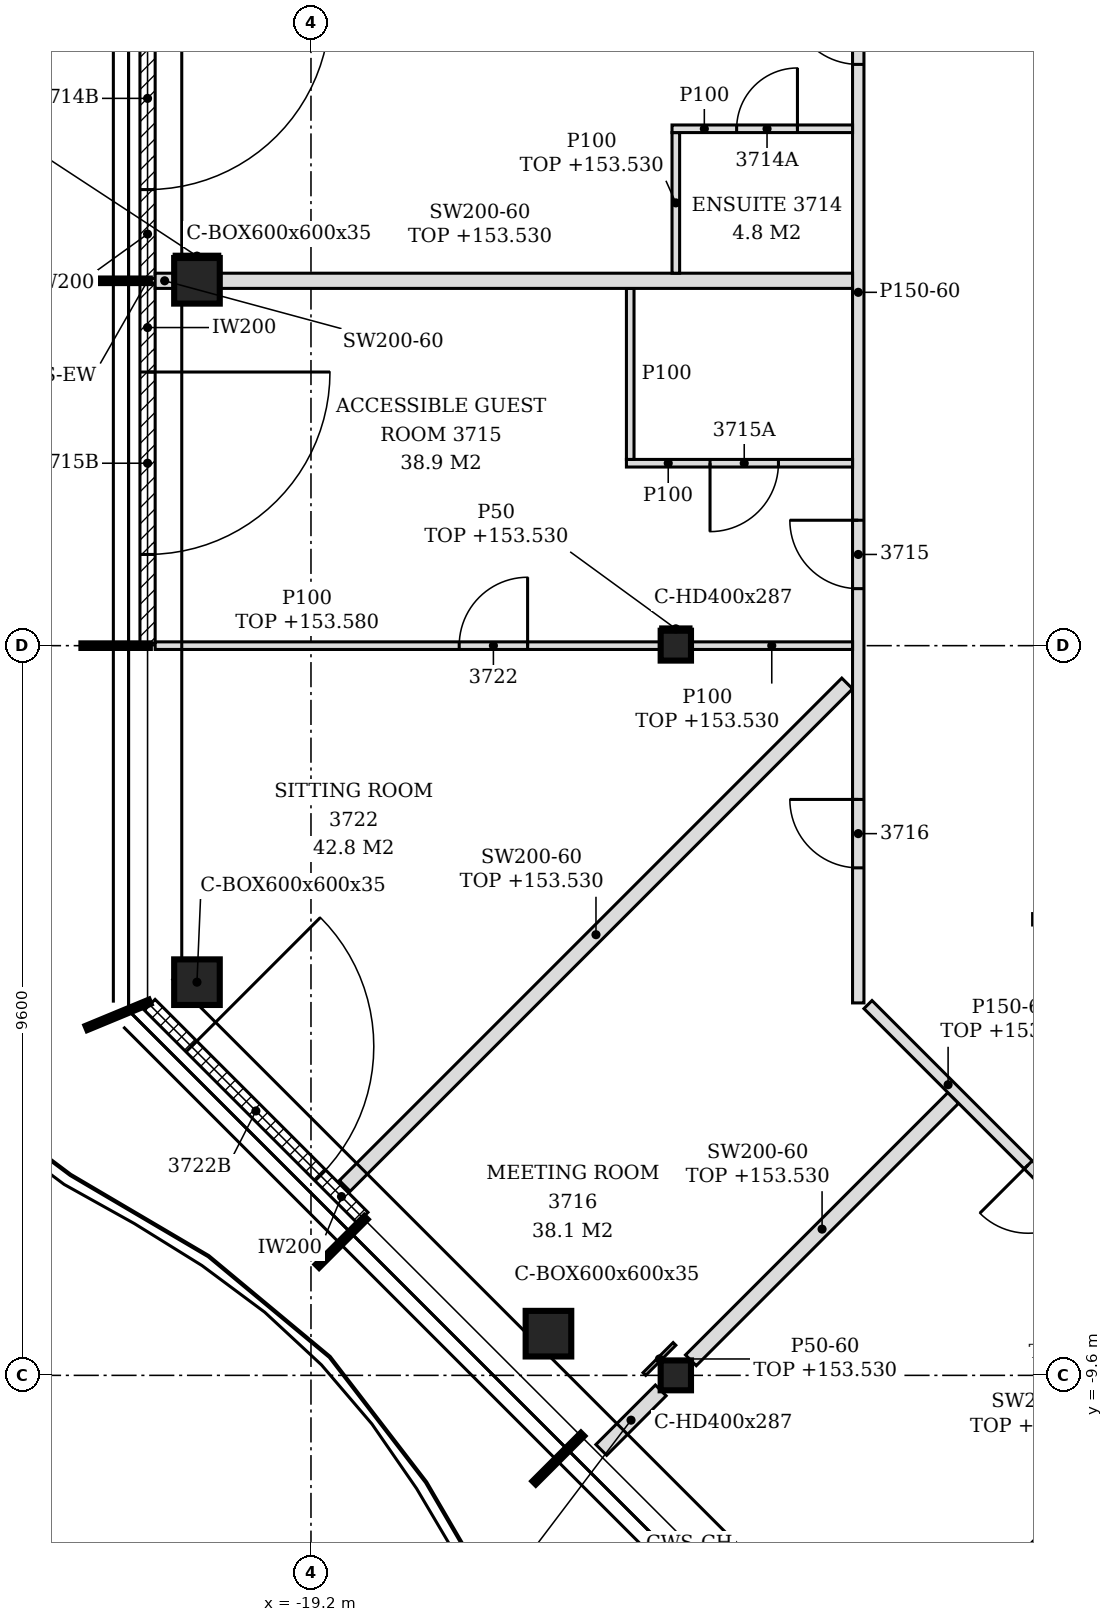
"""IFC4 building model, lengths in metres.
Left out: names, types, materials, properties, quantities, classifications, styles, units other than length and angle.
Written with IfcOpenShell. Run it as: python <this file> out.ifc"""

import sys

from ifc_helpers import new_model, si_unit, direction, frame, frame_2d, origin, origin_2d, place, context, subcontext, project, spatial, polyline, rectangle, hollow_rectangle, i_section, outline, extrude, element, fill, save


model = new_model("IFC4")
c1 = context("Model", 3, precision=1e-05, world=origin(), true_north=direction((0.0, 1.0)))
c2 = subcontext(c1, "Body", "Model", "MODEL_VIEW")
j1 = project(units=[si_unit("LENGTHUNIT", "METRE"), si_unit("PLANEANGLEUNIT", "RADIAN")], contexts=[c1])
p1 = place(None, origin())
s1 = spatial("IfcSite", under=j1, at=p1, CompositionType="ELEMENT")
p2 = place(p1, origin())
s2 = spatial("IfcBuilding", under=s1, at=p2, CompositionType="ELEMENT")
p3 = place(p2, frame((0.0, 0.0, 150.6)))
s3 = spatial("IfcBuildingStorey", under=s2, at=p3, CompositionType="ELEMENT", Elevation=150.6)
for number, where, z_axis, x_axis in (
    (1, (-20.7, 4.8, -0.15), (0.0, 0.0, 1.0), (1.0, 0.0, 0.0)),
    (2, (-20.7, -4.427, -0.15), (0.0, 0.0, 1.0), (1.0, 0.0, 0.0)),
    (3, (-16.076, -9.052, -0.15), (0.0, 0.0, 1.0), (1.0, 0.0, 0.0)),
):
    element("IfcColumn", number, at=place(p3, frame(where, z_axis=z_axis, x_axis=x_axis)), inside=s3, PredefinedType="COLUMN", context=c2, shape_type="SweptSolid", body=[
        extrude(hollow_rectangle(XDim=0.6, YDim=0.6, WallThickness=0.035, at=origin_2d()), origin(), (0.0, 0.0, 1.0), 3.6),
    ])
for number, where, z_axis, x_axis in (
    (4, (-14.4, -9.6, -0.15), (0.0, 0.0, 1.0), (1.0, 0.0, 0.0)),
    (5, (-14.4, 0.0, -0.15), (0.0, 0.0, 1.0), (1.0, 0.0, 0.0)),
):
    element("IfcColumn", number, at=place(p3, frame(where, z_axis=z_axis, x_axis=x_axis)), inside=s3, PredefinedType="COLUMN", context=c2, shape_type="SweptSolid", body=[
        extrude(i_section(OverallWidth=0.399, OverallDepth=0.393, WebThickness=0.023, FlangeThickness=0.037, FilletRadius=0.015, at=origin_2d()), origin(), (0.0, 0.0, 1.0), 3.6),
    ])
p4 = place(p3, frame((-21.35, 9.57, 0.0), z_axis=(0.0, 0.0, 1.0), x_axis=(0.0, -1.0, 0.0)))
e6 = element("IfcWall", 6, at=p4, inside=s3, PredefinedType="NOTDEFINED", context=c2, shape_type="SweptSolid", body=[
    extrude(rectangle(XDim=4.74, YDim=0.2, at=frame_2d((2.37, 0.0))), origin(), (0.0, 0.0, 1.0), 3.45),
])
p5 = place(p4, frame((1.17, 0.0, 0.0)))
e7 = element("IfcOpeningElement", 7, at=p5, cuts=e6, PredefinedType="OPENING", context=c2, shape_type="SweptSolid", body=[
    extrude(rectangle(XDim=2.4, YDim=2.4, at=frame_2d((1.2, 1.2))), frame((0.0, 0.11, 0.0), z_axis=(0.0, -1.0, 0.0), x_axis=(1.0, 0.0, 0.0)), (0.0, 0.0, 1.0), 0.22),
])
p6 = place(p3, frame((-21.35, 4.77, 0.0), z_axis=(0.0, 0.0, 1.0), x_axis=(0.0, -1.0, 0.0)))
e8 = element("IfcWall", 8, at=p6, inside=s3, PredefinedType="NOTDEFINED", context=c2, shape_type="SweptSolid", body=[
    extrude(rectangle(XDim=4.74, YDim=0.2, at=frame_2d((2.37, 0.0))), origin(), (0.0, 0.0, 1.0), 3.45),
])
p7 = place(p6, frame((1.17, 0.0, 0.0)))
e9 = element("IfcOpeningElement", 9, at=p7, cuts=e8, PredefinedType="OPENING", context=c2, shape_type="SweptSolid", body=[
    extrude(rectangle(XDim=2.4, YDim=2.4, at=frame_2d((1.2, 1.2))), frame((0.0, 0.11, 0.0), z_axis=(0.0, -1.0, 0.0), x_axis=(1.0, 0.0, 0.0)), (0.0, 0.0, 1.0), 0.22),
])
p8 = place(p3, frame((-21.322, -4.725, 0.0), z_axis=(0.0, 0.0, 1.0), x_axis=(0.707106781187, -0.707106781187, 0.0)))
e10 = element("IfcWall", 10, at=p8, inside=s3, PredefinedType="NOTDEFINED", context=c2, shape_type="SweptSolid", body=[
    extrude(rectangle(XDim=3.962, YDim=0.2, at=frame_2d((1.981, 0.0))), origin(), (0.0, 0.0, 1.0), 3.45),
])
p9 = place(p8, frame((0.775, 0.0, 0.0)))
e11 = element("IfcOpeningElement", 11, at=p9, cuts=e10, PredefinedType="OPENING", context=c2, shape_type="SweptSolid", body=[
    extrude(rectangle(XDim=2.4, YDim=2.4, at=frame_2d((1.2, 1.2))), frame((0.0, 0.11, 0.0), z_axis=(0.0, -1.0, 0.0), x_axis=(1.0, 0.0, 0.0)), (0.0, 0.0, 1.0), 0.22),
])
p10 = place(p3, frame((-11.152, -13.375, 0.0), z_axis=(0.0, 0.0, 1.0), x_axis=(0.707106781187, 0.707106781187, 0.0)))
e12 = element("IfcWall", 12, at=p10, inside=s3, PredefinedType="PARTITIONING", context=c2, shape_type="SweptSolid", body=[
    extrude(rectangle(XDim=6.83, YDim=0.2, at=frame_2d((3.415, 0.0))), origin(), (0.0, 0.0, 1.0), 2.93),
])
p11 = place(p3, frame((-15.381, -10.581, 0.0), z_axis=(0.0, 0.0, 1.0), x_axis=(0.707217034054, 0.706996511125, 0.0)))
e13 = element("IfcWall", 13, at=p11, inside=s3, PredefinedType="PARTITIONING", context=c2, shape_type="SweptSolid", body=[
    extrude(rectangle(XDim=1.107, YDim=0.2, at=frame_2d((0.554, 0.0))), origin(), (0.0, 0.0, 1.0), 2.63),
])
p12 = place(p3, frame((-14.202, -9.402, 0.0), z_axis=(0.0, 0.0, 1.0), x_axis=(0.707081776084, 0.707131785404, 0.0)))
e14 = element("IfcWall", 14, at=p12, inside=s3, PredefinedType="PARTITIONING", context=c2, shape_type="SweptSolid", body=[
    extrude(rectangle(XDim=4.882, YDim=0.2, at=frame_2d((2.441, 0.0))), origin(), (0.0, 0.0, 1.0), 2.93),
])
p13 = place(p3, frame((-8.322, -8.272, 0.0), z_axis=(0.0, 0.0, 1.0), x_axis=(-0.707106781187, 0.707106781187, 0.0)))
e15 = element("IfcWall", 15, at=p13, inside=s3, PredefinedType="PARTITIONING", context=c2, shape_type="SweptSolid", body=[
    extrude(rectangle(XDim=5.021, YDim=0.15, at=frame_2d((2.51, 0.0))), origin(), (0.0, 0.0, 1.0), 2.93),
])
p14 = place(p13, frame((1.139, 0.0, 0.0)))
e16 = element("IfcOpeningElement", 16, at=p14, cuts=e15, PredefinedType="OPENING", context=c2, shape_type="SweptSolid", body=[
    extrude(rectangle(XDim=0.9, YDim=2.1, at=frame_2d((0.45, 1.05))), frame((0.0, 0.085, 0.0), z_axis=(0.0, -1.0, 0.0), x_axis=(1.0, 0.0, 0.0)), (0.0, 0.0, 1.0), 0.17),
])
p15 = place(p3, frame((-18.755, -7.107, 0.0), z_axis=(0.0, 0.0, 1.0), x_axis=(0.707106781187, 0.707106781187, 0.0)))
e17 = element("IfcWall", 17, at=p15, inside=s3, PredefinedType="PARTITIONING", context=c2, shape_type="SweptSolid", body=[
    extrude(rectangle(XDim=9.347, YDim=0.2, at=frame_2d((4.674, 0.0))), origin(), (0.0, 0.0, 1.0), 2.93),
])
p16 = place(p3, frame((-12.0, -4.7, 0.0), z_axis=(0.0, 0.0, 1.0), x_axis=(0.0, 1.0, 0.0)))
e18 = element("IfcWall", 18, at=p16, inside=s3, PredefinedType="PARTITIONING", context=c2, shape_type="SweptSolid", body=[
    extrude(outline(polyline([(0.0, 0.0), (13.913, 0.0), (13.913, 3.45), (9.6, 3.45), (9.598, 2.93), (9.4, 2.93), (9.398, 3.45), (4.8, 3.45), (4.798, 2.93), (4.6, 2.93), (4.598, 3.45), (0.0, 3.45), (0.0, 0.0)])), frame((0.0, 0.075, 0.0), z_axis=(0.0, -1.0, 0.0), x_axis=(1.0, 0.0, 0.0)), (0.0, 0.0, 1.0), 0.15),
])
p17 = place(p16, frame((12.347, 0.0, 0.0)))
e19 = element("IfcOpeningElement", 19, at=p17, cuts=e18, PredefinedType="OPENING", context=c2, shape_type="SweptSolid", body=[
    extrude(rectangle(XDim=0.9, YDim=2.1, at=frame_2d((0.45, 1.05))), frame((0.0, 0.085, 0.0), z_axis=(0.0, -1.0, 0.0), x_axis=(1.0, 0.0, 0.0)), (0.0, 0.0, 1.0), 0.17),
])
p18 = place(p16, frame((5.45, 0.0, 0.0)))
e20 = element("IfcOpeningElement", 20, at=p18, cuts=e18, PredefinedType="OPENING", context=c2, shape_type="SweptSolid", body=[
    extrude(rectangle(XDim=0.9, YDim=2.1, at=frame_2d((0.45, 1.05))), frame((0.0, 0.085, 0.0), z_axis=(0.0, -1.0, 0.0), x_axis=(1.0, 0.0, 0.0)), (0.0, 0.0, 1.0), 0.17),
])
p19 = place(p16, frame((1.777, 0.0, 0.0)))
e21 = element("IfcOpeningElement", 21, at=p19, cuts=e18, PredefinedType="OPENING", context=c2, shape_type="SweptSolid", body=[
    extrude(rectangle(XDim=0.9, YDim=2.1, at=frame_2d((0.45, 1.05))), frame((0.0, 0.085, 0.0), z_axis=(0.0, -1.0, 0.0), x_axis=(1.0, 0.0, 0.0)), (0.0, 0.0, 1.0), 0.17),
])
p20 = place(p3, frame((-9.706, -3.6, 0.0), z_axis=(0.0, 0.0, 1.0), x_axis=(1.0, 0.0, 0.0)))
e22 = element("IfcWall", 22, at=p20, inside=s3, PredefinedType="PARTITIONING", context=c2, shape_type="SweptSolid", body=[
    extrude(outline(polyline([(0.0, 0.0), (4.981, 0.0), (4.981, 2.83), (4.756, 2.83), (4.754, 3.45), (0.0, 3.45), (0.0, 0.0)])), frame((0.0, 0.075, 0.0), z_axis=(0.0, -1.0, 0.0), x_axis=(1.0, 0.0, 0.0)), (0.0, 0.0, 1.0), 0.15),
])
p21 = place(p3, frame((-21.25, 0.0, 0.0), z_axis=(0.0, 0.0, 1.0), x_axis=(1.0, 0.0, 0.0)))
e23 = element("IfcWall", 23, at=p21, inside=s3, PredefinedType="PARTITIONING", context=c2, shape_type="SweptSolid", body=[
    extrude(outline(polyline([(0.0, 0.0), (6.65, 0.0), (6.65, 2.98), (0.7, 2.98), (0.698, 2.93), (0.4, 2.93), (0.398, 2.98), (0.0, 2.98), (0.0, 0.0)])), frame((0.0, 0.05, 0.0), z_axis=(0.0, -1.0, 0.0), x_axis=(1.0, 0.0, 0.0)), (0.0, 0.0, 1.0), 0.1),
])
p22 = place(p21, frame((4.0, 0.0, 0.0)))
e24 = element("IfcOpeningElement", 24, at=p22, cuts=e23, PredefinedType="OPENING", context=c2, shape_type="SweptSolid", body=[
    extrude(rectangle(XDim=0.9, YDim=2.1, at=frame_2d((0.45, 1.05))), frame((0.0, 0.06, 0.0), z_axis=(0.0, -1.0, 0.0), x_axis=(1.0, 0.0, 0.0)), (0.0, 0.0, 1.0), 0.12),
])
p23 = place(p3, frame((-14.2, 0.0, 0.0), z_axis=(0.0, 0.0, 1.0), x_axis=(1.0, 0.0, 0.0)))
e25 = element("IfcWall", 25, at=p23, inside=s3, PredefinedType="PARTITIONING", context=c2, shape_type="SweptSolid", body=[
    extrude(rectangle(XDim=2.125, YDim=0.1, at=frame_2d((1.063, 0.0))), origin(), (0.0, 0.0, 1.0), 2.93),
])
p24 = place(p3, frame((-15.05, 2.4, 0.0), z_axis=(0.0, 0.0, 1.0), x_axis=(1.0, 0.0, 0.0)))
e26 = element("IfcWall", 26, at=p24, inside=s3, PredefinedType="PARTITIONING", context=c2, shape_type="SweptSolid", body=[
    extrude(outline(polyline([(0.0, 0.0), (2.975, 0.0), (2.975, 3.45), (0.8, 3.45), (0.798, 2.93), (0.5, 2.93), (0.498, 3.45), (0.0, 3.45), (0.0, 0.0)])), frame((0.0, 0.05, 0.0), z_axis=(0.0, -1.0, 0.0), x_axis=(1.0, 0.0, 0.0)), (0.0, 0.0, 1.0), 0.1),
])
p25 = place(p24, frame((1.1, 0.0, 0.0)))
e27 = element("IfcOpeningElement", 27, at=p25, cuts=e26, PredefinedType="OPENING", context=c2, shape_type="SweptSolid", body=[
    extrude(rectangle(XDim=0.9, YDim=2.1, at=frame_2d((0.45, 1.05))), frame((0.0, 0.06, 0.0), z_axis=(0.0, -1.0, 0.0), x_axis=(1.0, 0.0, 0.0)), (0.0, 0.0, 1.0), 0.12),
])
p26 = place(p3, frame((-15.0, 2.45, 0.0), z_axis=(0.0, 0.0, 1.0), x_axis=(0.0, 1.0, 0.0)))
e28 = element("IfcWall", 28, at=p26, inside=s3, PredefinedType="PARTITIONING", context=c2, shape_type="SweptSolid", body=[
    extrude(rectangle(XDim=2.25, YDim=0.1, at=frame_2d((1.125, 0.0))), origin(), (0.0, 0.0, 1.0), 3.45),
])
p27 = place(p3, frame((-21.25, 4.8, 0.0), z_axis=(0.0, 0.0, 1.0), x_axis=(1.0, 0.0, 0.0)))
e29 = element("IfcWall", 29, at=p27, inside=s3, PredefinedType="PARTITIONING", context=c2, shape_type="SweptSolid", body=[
    extrude(rectangle(XDim=0.25, YDim=0.2, at=frame_2d((0.125, 0.0))), origin(), (0.0, 0.0, 1.0), 3.45),
])
p28 = place(p3, frame((-20.4, 4.8, 0.0), z_axis=(0.0, 0.0, 1.0), x_axis=(1.0, 0.0, 0.0)))
e30 = element("IfcWall", 30, at=p28, inside=s3, PredefinedType="PARTITIONING", context=c2, shape_type="SweptSolid", body=[
    extrude(rectangle(XDim=8.325, YDim=0.2, at=frame_2d((4.163, 0.0))), origin(), (0.0, 0.0, 1.0), 2.93),
])
p29 = place(p3, frame((-14.4, 4.9, 0.0), z_axis=(0.0, 0.0, 1.0), x_axis=(0.0, 1.0, 0.0)))
e31 = element("IfcWall", 31, at=p29, inside=s3, PredefinedType="PARTITIONING", context=c2, shape_type="SweptSolid", body=[
    extrude(rectangle(XDim=1.85, YDim=0.1, at=frame_2d((0.925, 0.0))), origin(), (0.0, 0.0, 1.0), 2.93),
])
p30 = place(p3, frame((-14.45, 6.8, 0.0), z_axis=(0.0, 0.0, 1.0), x_axis=(1.0, 0.0, 0.0)))
e32 = element("IfcWall", 32, at=p30, inside=s3, PredefinedType="PARTITIONING", context=c2, shape_type="SweptSolid", body=[
    extrude(outline(polyline([(0.0, 0.0), (2.375, 0.0), (2.375, 3.45), (0.2, 3.45), (0.198, 2.93), (0.0, 2.93), (0.0, 0.0)])), frame((0.0, 0.05, 0.0), z_axis=(0.0, -1.0, 0.0), x_axis=(1.0, 0.0, 0.0)), (0.0, 0.0, 1.0), 0.1),
])
p31 = place(p30, frame((0.85, 0.0, 0.0)))
e33 = element("IfcOpeningElement", 33, at=p31, cuts=e32, PredefinedType="OPENING", context=c2, shape_type="SweptSolid", body=[
    extrude(rectangle(XDim=0.8, YDim=2.1, at=frame_2d((0.4, 1.05))), frame((0.0, 0.06, 0.0), z_axis=(0.0, -1.0, 0.0), x_axis=(1.0, 0.0, 0.0)), (0.0, 0.0, 1.0), 0.12),
])
p32 = place(p3, frame((-14.814, -9.582, 0.0), z_axis=(0.0, 0.0, 1.0), x_axis=(0.707106781187, 0.707106781187, 0.0)))
e34 = element("IfcWall", 34, at=p32, inside=s3, PredefinedType="PARTITIONING", context=c2, shape_type="SweptSolid", body=[
    extrude(rectangle(XDim=0.56, YDim=0.05, at=frame_2d((0.28, 0.0))), origin(), (0.0, 0.0, 1.0), 2.93),
])
p33 = place(p3, frame((-14.6, 0.221, 0.0), z_axis=(0.0, 0.0, 1.0), x_axis=(1.0, 0.0, 0.0)))
e35 = element("IfcWall", 35, at=p33, inside=s3, PredefinedType="PARTITIONING", context=c2, shape_type="SweptSolid", body=[
    extrude(rectangle(XDim=0.399, YDim=0.05, at=frame_2d((0.2, 0.0))), origin(), (0.0, 0.0, 1.0), 2.93),
])
p34 = place(p3, frame((-21.0, 5.125, 0.0), z_axis=(0.0, 0.0, 1.0), x_axis=(1.0, 0.0, 0.0)))
e36 = element("IfcWall", 36, at=p34, inside=s3, PredefinedType="PARTITIONING", context=c2, shape_type="SweptSolid", body=[
    extrude(rectangle(XDim=0.6, YDim=0.05, at=frame_2d((0.3, 0.0))), origin(), (0.0, 0.0, 1.0), 2.93),
])
p35 = place(p5, origin())
e37 = element("IfcDoor", 37, at=p35, inside=s3, OperationType="SINGLE_SWING_LEFT", PredefinedType="DOOR", context=c2, shape_type="SweptSolid", body=[
    extrude(rectangle(XDim=2.4, YDim=2.4, at=frame_2d((1.2, 1.2))), frame((0.0, 0.025, 0.0), z_axis=(0.0, -1.0, 0.0), x_axis=(1.0, 0.0, 0.0)), (0.0, 0.0, 1.0), 0.05),
])
fill(e7, e37)
p36 = place(p7, origin())
e38 = element("IfcDoor", 38, at=p36, inside=s3, OperationType="SINGLE_SWING_LEFT", PredefinedType="DOOR", context=c2, shape_type="SweptSolid", body=[
    extrude(rectangle(XDim=2.4, YDim=2.4, at=frame_2d((1.2, 1.2))), frame((0.0, 0.025, 0.0), z_axis=(0.0, -1.0, 0.0), x_axis=(1.0, 0.0, 0.0)), (0.0, 0.0, 1.0), 0.05),
])
fill(e9, e38)
p37 = place(p9, origin())
e39 = element("IfcDoor", 39, at=p37, inside=s3, OperationType="SINGLE_SWING_LEFT", PredefinedType="DOOR", context=c2, shape_type="SweptSolid", body=[
    extrude(rectangle(XDim=2.4, YDim=2.4, at=frame_2d((1.2, 1.2))), frame((0.0, 0.025, 0.0), z_axis=(0.0, -1.0, 0.0), x_axis=(1.0, 0.0, 0.0)), (0.0, 0.0, 1.0), 0.05),
])
fill(e11, e39)
p38 = place(p17, origin())
e40 = element("IfcDoor", 40, at=p38, inside=s3, OperationType="SINGLE_SWING_RIGHT", PredefinedType="DOOR", context=c2, shape_type="SweptSolid", body=[
    extrude(rectangle(XDim=0.9, YDim=2.1, at=frame_2d((0.45, 1.05))), frame((0.0, 0.025, 0.0), z_axis=(0.0, -1.0, 0.0), x_axis=(1.0, 0.0, 0.0)), (0.0, 0.0, 1.0), 0.05),
])
fill(e19, e40)
p39 = place(p31, origin())
e41 = element("IfcDoor", 41, at=p39, inside=s3, OperationType="SINGLE_SWING_RIGHT", PredefinedType="DOOR", context=c2, shape_type="SweptSolid", body=[
    extrude(rectangle(XDim=0.8, YDim=2.1, at=frame_2d((0.4, 1.05))), frame((0.0, 0.025, 0.0), z_axis=(0.0, -1.0, 0.0), x_axis=(1.0, 0.0, 0.0)), (0.0, 0.0, 1.0), 0.05),
])
fill(e33, e41)
p40 = place(p18, origin())
e42 = element("IfcDoor", 42, at=p40, inside=s3, OperationType="SINGLE_SWING_RIGHT", PredefinedType="DOOR", context=c2, shape_type="SweptSolid", body=[
    extrude(rectangle(XDim=0.9, YDim=2.1, at=frame_2d((0.45, 1.05))), frame((0.0, 0.025, 0.0), z_axis=(0.0, -1.0, 0.0), x_axis=(1.0, 0.0, 0.0)), (0.0, 0.0, 1.0), 0.05),
])
fill(e20, e42)
p41 = place(p25, frame((0.9, 0.0, 0.0), z_axis=(0.0, 0.0, 1.0), x_axis=(-1.0, 0.0, 0.0)))
e43 = element("IfcDoor", 43, at=p41, inside=s3, OperationType="SINGLE_SWING_RIGHT", PredefinedType="DOOR", context=c2, shape_type="SweptSolid", body=[
    extrude(rectangle(XDim=0.9, YDim=2.1, at=frame_2d((0.45, 1.05))), frame((0.0, 0.025, 0.0), z_axis=(0.0, -1.0, 0.0), x_axis=(1.0, 0.0, 0.0)), (0.0, 0.0, 1.0), 0.05),
])
fill(e27, e43)
p42 = place(p19, origin())
e44 = element("IfcDoor", 44, at=p42, inside=s3, OperationType="SINGLE_SWING_RIGHT", PredefinedType="DOOR", context=c2, shape_type="SweptSolid", body=[
    extrude(rectangle(XDim=0.9, YDim=2.1, at=frame_2d((0.45, 1.05))), frame((0.0, 0.025, 0.0), z_axis=(0.0, -1.0, 0.0), x_axis=(1.0, 0.0, 0.0)), (0.0, 0.0, 1.0), 0.05),
])
fill(e21, e44)
p43 = place(p14, origin())
e45 = element("IfcDoor", 45, at=p43, inside=s3, OperationType="SINGLE_SWING_RIGHT", PredefinedType="DOOR", context=c2, shape_type="SweptSolid", body=[
    extrude(rectangle(XDim=0.9, YDim=2.1, at=frame_2d((0.45, 1.05))), frame((0.0, 0.025, 0.0), z_axis=(0.0, -1.0, 0.0), x_axis=(1.0, 0.0, 0.0)), (0.0, 0.0, 1.0), 0.05),
])
fill(e16, e45)
p44 = place(p22, origin())
e46 = element("IfcDoor", 46, at=p44, inside=s3, OperationType="SINGLE_SWING_RIGHT", PredefinedType="DOOR", context=c2, shape_type="SweptSolid", body=[
    extrude(rectangle(XDim=0.9, YDim=2.1, at=frame_2d((0.45, 1.05))), frame((0.0, 0.025, 0.0), z_axis=(0.0, -1.0, 0.0), x_axis=(1.0, 0.0, 0.0)), (0.0, 0.0, 1.0), 0.05),
])
fill(e24, e46)
save(model, sys.argv[1])
